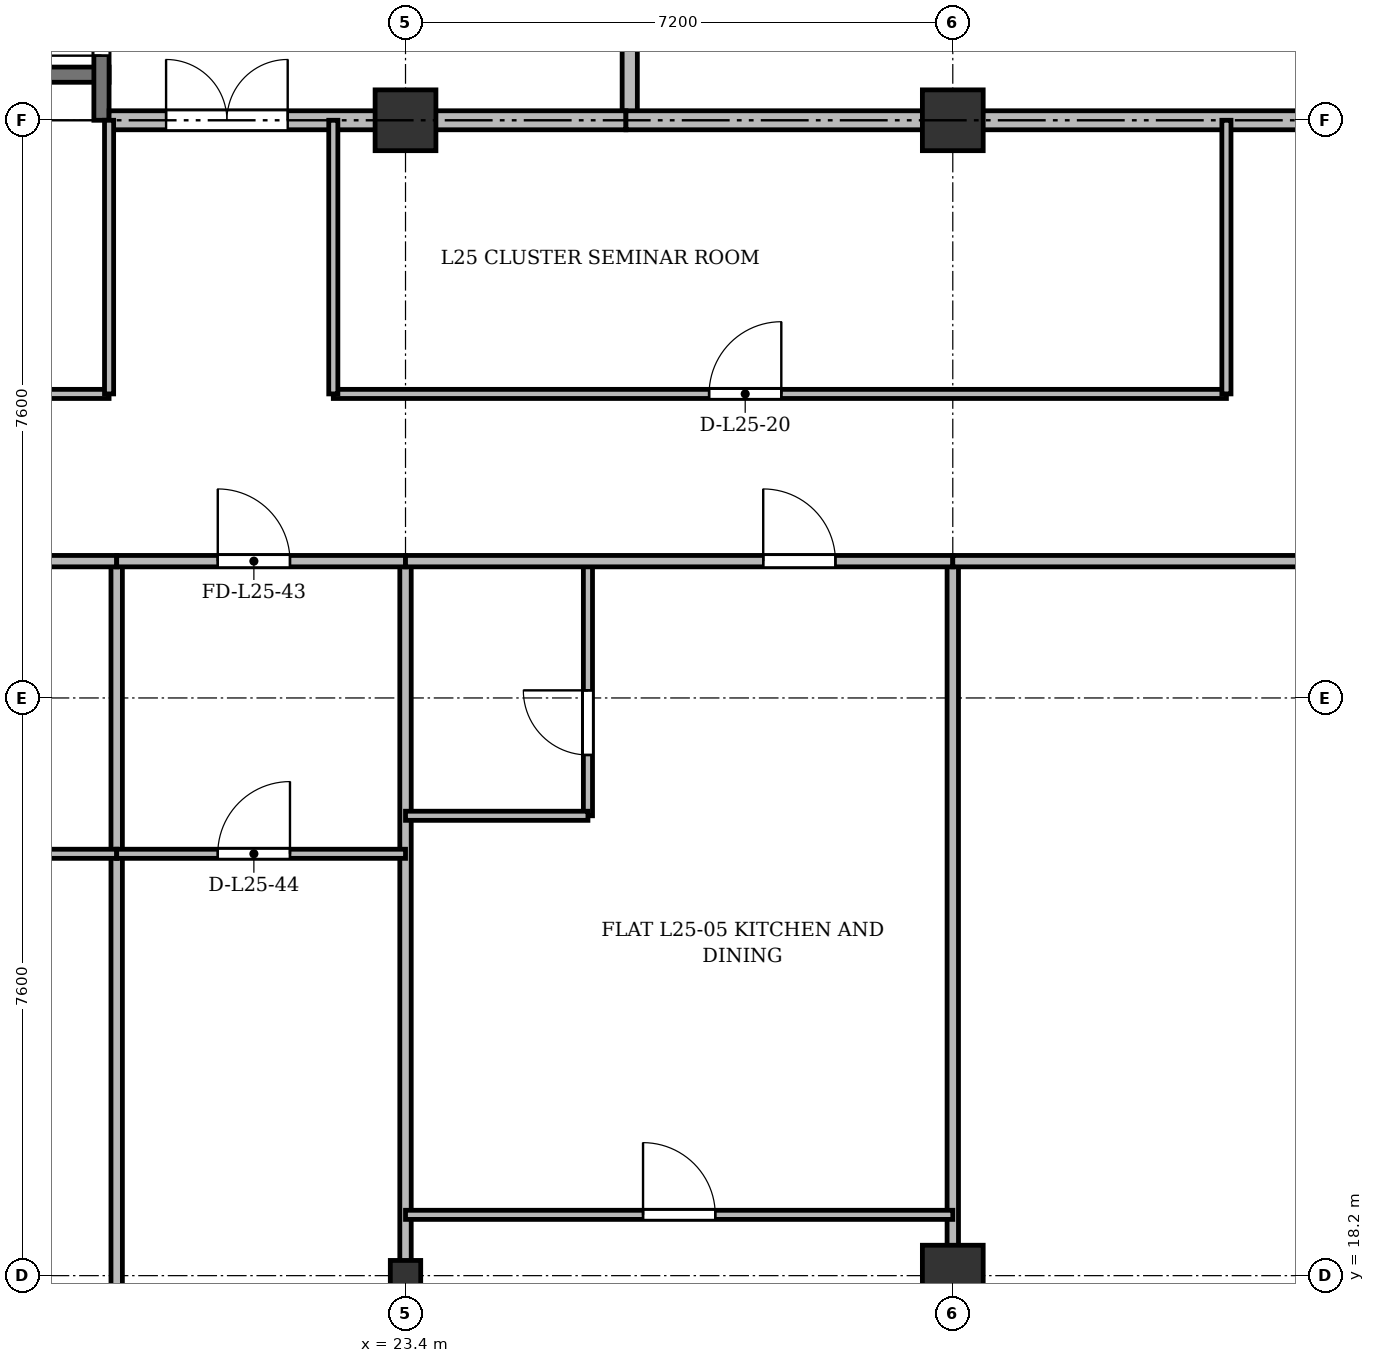
"""IFC4 building model, lengths in metres.
Left out: names, types, materials, properties, quantities, classifications, styles, units other than length and angle.
Written with IfcOpenShell. Run it as: python <this file> out.ifc"""

import sys

from ifc_helpers import new_model, si_unit, direction, frame, frame_2d, origin, origin_2d, place, context, subcontext, project, spatial, rectangle, i_section, extrude, source, transform, mapped, element, fill, save


model = new_model("IFC4")
c1 = context("Model", 3, precision=1e-05, world=origin(), true_north=direction((0.0, 1.0)))
c2 = subcontext(c1, "Body", "Model", "MODEL_VIEW")
j1 = project(units=[si_unit("LENGTHUNIT", "METRE"), si_unit("PLANEANGLEUNIT", "RADIAN")], contexts=[c1])
p1 = place(None, origin())
s1 = spatial("IfcSite", under=j1, at=p1, CompositionType="ELEMENT")
p2 = place(p1, origin())
s2 = spatial("IfcBuilding", under=s1, at=p2, CompositionType="ELEMENT")
p3 = place(p2, frame((0.0, 0.0, 99.7)))
s3 = spatial("IfcBuildingStorey", under=s2, at=p3, CompositionType="ELEMENT", Elevation=99.7)
m1 = source(origin(), c2, "Body", "SweptSolid", [
    extrude(i_section(OverallWidth=0.4, OverallDepth=0.4, WebThickness=0.022, FlangeThickness=0.035, at=origin_2d()), origin(), (0.0, 0.0, 1.0), 3.6),
])
p4 = place(p3, frame((23.4, 18.2, 0.0), z_axis=(0.0, 0.0, 1.0), x_axis=(1.0, 0.0, 0.0)))
e1 = element("IfcColumn", 1, at=p4, inside=s3, PredefinedType="COLUMN", context=c2, shape_type="MappedRepresentation", body=[
    mapped(m1, transform((0.0, 0.0, 0.0), x_axis=(1.0, 0.0, 0.0), y_axis=(0.0, 1.0, 0.0), z_axis=(0.0, 0.0, 1.0), scale=1.0)),
])
m2 = source(origin(), c2, "Body", "SweptSolid", [
    extrude(rectangle(XDim=0.8, YDim=0.8, at=origin_2d()), origin(), (0.0, 0.0, 1.0), 3.6),
])
for number, where, z_axis, x_axis in (
    (2, (23.4, 33.4, 0.0), (0.0, 0.0, 1.0), (1.0, 0.0, 0.0)),
    (3, (30.6, 18.2, 0.0), (0.0, 0.0, 1.0), (1.0, 0.0, 0.0)),
    (4, (30.6, 33.4, 0.0), (0.0, 0.0, 1.0), (1.0, 0.0, 0.0)),
):
    element("IfcColumn", number, at=place(p3, frame(where, z_axis=z_axis, x_axis=x_axis)), inside=s3, PredefinedType="COLUMN", context=c2, shape_type="MappedRepresentation", body=[
        mapped(m2, transform((0.0, 0.0, 0.0), x_axis=(1.0, 0.0, 0.0), y_axis=(0.0, 1.0, 0.0), z_axis=(0.0, 0.0, 1.0), scale=1.0)),
    ])
p5 = place(p3, frame((16.1, 34.0, 0.0), z_axis=(0.0, 0.0, 1.0), x_axis=(1.0, 0.0, 0.0)))
e5 = element("IfcWall", 5, at=p5, inside=s3, PredefinedType="SHEAR", context=c2, shape_type="SweptSolid", body=[
    extrude(rectangle(XDim=3.4, YDim=0.2, at=frame_2d((1.7, 0.0))), origin(), (0.0, 0.0, 1.0), 3.34),
])
p6 = place(p3, frame((19.4, 33.4, 0.0), z_axis=(0.0, 0.0, 1.0), x_axis=(0.0, 1.0, 0.0)))
e6 = element("IfcWall", 6, at=p6, inside=s3, PredefinedType="SHEAR", context=c2, shape_type="SweptSolid", body=[
    extrude(rectangle(XDim=11.1, YDim=0.2, at=frame_2d((5.55, 0.0))), origin(), (0.0, 0.0, 1.0), 3.34),
])
p7 = place(p6, frame((0.85, 0.0, 0.0)))
e7 = element("IfcOpeningElement", 7, at=p7, cuts=e6, PredefinedType="OPENING", context=c2, shape_type="SweptSolid", body=[
    extrude(rectangle(XDim=1.1, YDim=2.15, at=frame_2d((0.55, 1.075))), frame((0.0, 0.11, 0.0), z_axis=(0.0, -1.0, 0.0), x_axis=(1.0, 0.0, 0.0)), (0.0, 0.0, 1.0), 0.22),
])
p8 = place(p3, frame((26.35, 33.4, 0.0), z_axis=(0.0, 0.0, 1.0), x_axis=(0.0, 1.0, 0.0)))
e8 = element("IfcWall", 8, at=p8, inside=s3, PredefinedType="SOLIDWALL", context=c2, shape_type="SweptSolid", body=[
    extrude(rectangle(XDim=11.3, YDim=0.2, at=frame_2d((5.65, 0.0))), origin(), (0.0, 0.0, 1.0), 2.752),
])
p9 = place(p3, frame((19.5, 33.4, 0.0), z_axis=(0.0, 0.0, 1.0), x_axis=(1.0, 0.0, 0.0)))
e9 = element("IfcWall", 9, at=p9, inside=s3, PredefinedType="PARTITIONING", context=c2, shape_type="SweptSolid", body=[
    extrude(rectangle(XDim=6.8, YDim=0.25, at=frame_2d((3.4, 0.0))), origin(), (0.0, 0.0, 1.0), 2.752),
])
p10 = place(p9, frame((0.75, 0.0, 0.0)))
e10 = element("IfcOpeningElement", 10, at=p10, cuts=e9, PredefinedType="OPENING", context=c2, shape_type="SweptSolid", body=[
    extrude(rectangle(XDim=1.6, YDim=2.2, at=frame_2d((0.8, 1.1))), frame((0.0, 0.135, 0.0), z_axis=(0.0, -1.0, 0.0), x_axis=(1.0, 0.0, 0.0)), (0.0, 0.0, 1.0), 0.27),
])
p11 = place(p3, frame((26.3, 33.4, 0.0), z_axis=(0.0, 0.0, 1.0), x_axis=(1.0, 0.0, 0.0)))
e11 = element("IfcWall", 11, at=p11, inside=s3, PredefinedType="PARTITIONING", context=c2, shape_type="SweptSolid", body=[
    extrude(rectangle(XDim=20.85, YDim=0.25, at=frame_2d((10.425, 0.0))), origin(), (0.0, 0.0, 1.0), 2.752),
])
p12 = place(p11, frame((9.2, 0.0, 0.0)))
e12 = element("IfcOpeningElement", 12, at=p12, cuts=e11, PredefinedType="OPENING", context=c2, shape_type="SweptSolid", body=[
    extrude(rectangle(XDim=1.6, YDim=2.2, at=frame_2d((0.8, 1.1))), frame((0.0, 0.135, 0.0), z_axis=(0.0, -1.0, 0.0), x_axis=(1.0, 0.0, 0.0)), (0.0, 0.0, 1.0), 0.27),
])
p13 = place(p3, frame((4.75, 29.8, 0.0), z_axis=(0.0, 0.0, 1.0), x_axis=(1.0, 0.0, 0.0)))
e13 = element("IfcWall", 13, at=p13, inside=s3, PredefinedType="PARTITIONING", context=c2, shape_type="SweptSolid", body=[
    extrude(rectangle(XDim=14.75, YDim=0.12, at=frame_2d((7.375, 0.0))), origin(), (0.0, 0.0, 1.0), 2.84),
])
p14 = place(p13, frame((6.9, 0.0, 0.0)))
e14 = element("IfcOpeningElement", 14, at=p14, cuts=e13, PredefinedType="OPENING", context=c2, shape_type="SweptSolid", body=[
    extrude(rectangle(XDim=0.95, YDim=2.15, at=frame_2d((0.475, 1.075))), frame((0.0, 0.07, 0.0), z_axis=(0.0, -1.0, 0.0), x_axis=(1.0, 0.0, 0.0)), (0.0, 0.0, 1.0), 0.14),
])
p15 = place(p3, frame((22.45, 29.8, 0.0), z_axis=(0.0, 0.0, 1.0), x_axis=(1.0, 0.0, 0.0)))
e15 = element("IfcWall", 15, at=p15, inside=s3, PredefinedType="PARTITIONING", context=c2, shape_type="SweptSolid", body=[
    extrude(rectangle(XDim=11.75, YDim=0.12, at=frame_2d((5.875, 0.0))), origin(), (0.0, 0.0, 1.0), 2.84),
])
p16 = place(p15, frame((4.944, 0.0, 0.0)))
e16 = element("IfcOpeningElement", 16, at=p16, cuts=e15, PredefinedType="OPENING", context=c2, shape_type="SweptSolid", body=[
    extrude(rectangle(XDim=0.95, YDim=2.15, at=frame_2d((0.475, 1.075))), frame((0.0, 0.07, 0.0), z_axis=(0.0, -1.0, 0.0), x_axis=(1.0, 0.0, 0.0)), (0.0, 0.0, 1.0), 0.14),
])
for number, where, z_axis, x_axis in (
    (17, (19.5, 29.8, 0.0), (0.0, 0.0, 1.0), (0.0, 1.0, 0.0)),
    (18, (22.45, 29.8, 0.0), (0.0, 0.0, 1.0), (0.0, 1.0, 0.0)),
    (19, (34.2, 29.8, 0.0), (0.0, 0.0, 1.0), (0.0, 1.0, 0.0)),
):
    element("IfcWall", number, at=place(p3, frame(where, z_axis=z_axis, x_axis=x_axis)), inside=s3, PredefinedType="PARTITIONING", context=c2, shape_type="SweptSolid", body=[
        extrude(rectangle(XDim=3.6, YDim=0.12, at=frame_2d((1.8, 0.0))), origin(), (0.0, 0.0, 1.0), 2.752),
    ])
p17 = place(p3, frame((19.6, 3.145, 0.0), z_axis=(0.0, 0.0, 1.0), x_axis=(0.0, 1.0, 0.0)))
e20 = element("IfcWall", 20, at=p17, inside=s3, PredefinedType="PARTITIONING", context=c2, shape_type="SweptSolid", body=[
    extrude(rectangle(XDim=24.455, YDim=0.15, at=frame_2d((12.228, 0.0))), origin(), (0.0, 0.0, 1.0), 2.752),
])
for number, where, z_axis, x_axis in (
    (21, (23.4, 3.145, 0.0), (0.0, 0.0, 1.0), (0.0, 1.0, 0.0)),
    (22, (30.6, 3.145, 0.0), (0.0, 0.0, 1.0), (0.0, 1.0, 0.0)),
):
    element("IfcWall", number, at=place(p3, frame(where, z_axis=z_axis, x_axis=x_axis)), inside=s3, PredefinedType="PARTITIONING", context=c2, shape_type="SweptSolid", body=[
        extrude(rectangle(XDim=24.455, YDim=0.15, at=frame_2d((12.228, 0.0))), origin(), (0.0, 0.0, 1.0), 2.84),
    ])
p18 = place(p3, frame((15.6, 27.6, 0.0), z_axis=(0.0, 0.0, 1.0), x_axis=(1.0, 0.0, 0.0)))
e23 = element("IfcWall", 23, at=p18, inside=s3, PredefinedType="PARTITIONING", context=c2, shape_type="SweptSolid", body=[
    extrude(rectangle(XDim=4.0, YDim=0.15, at=frame_2d((2.0, 0.0))), origin(), (0.0, 0.0, 1.0), 2.84),
])
p19 = place(p18, frame((1.525, 0.0, 0.0)))
e24 = element("IfcOpeningElement", 24, at=p19, cuts=e23, PredefinedType="OPENING", context=c2, shape_type="SweptSolid", body=[
    extrude(rectangle(XDim=0.95, YDim=2.15, at=frame_2d((0.475, 1.075))), frame((0.0, 0.085, 0.0), z_axis=(0.0, -1.0, 0.0), x_axis=(1.0, 0.0, 0.0)), (0.0, 0.0, 1.0), 0.17),
])
p20 = place(p3, frame((15.6, 23.75, 0.0), z_axis=(0.0, 0.0, 1.0), x_axis=(1.0, 0.0, 0.0)))
e25 = element("IfcWall", 25, at=p20, inside=s3, PredefinedType="PARTITIONING", context=c2, shape_type="SweptSolid", body=[
    extrude(rectangle(XDim=4.0, YDim=0.12, at=frame_2d((2.0, 0.0))), origin(), (0.0, 0.0, 1.0), 2.84),
])
p21 = place(p20, frame((1.525, 0.0, 0.0)))
e26 = element("IfcOpeningElement", 26, at=p21, cuts=e25, PredefinedType="OPENING", context=c2, shape_type="SweptSolid", body=[
    extrude(rectangle(XDim=0.95, YDim=2.15, at=frame_2d((0.475, 1.075))), frame((0.0, 0.07, 0.0), z_axis=(0.0, -1.0, 0.0), x_axis=(1.0, 0.0, 0.0)), (0.0, 0.0, 1.0), 0.14),
])
p22 = place(p3, frame((19.6, 27.6, 0.0), z_axis=(0.0, 0.0, 1.0), x_axis=(1.0, 0.0, 0.0)))
e27 = element("IfcWall", 27, at=p22, inside=s3, PredefinedType="PARTITIONING", context=c2, shape_type="SweptSolid", body=[
    extrude(rectangle(XDim=3.8, YDim=0.15, at=frame_2d((1.9, 0.0))), origin(), (0.0, 0.0, 1.0), 2.84),
])
p23 = place(p22, frame((1.33, 0.0, 0.0)))
e28 = element("IfcOpeningElement", 28, at=p23, cuts=e27, PredefinedType="OPENING", context=c2, shape_type="SweptSolid", body=[
    extrude(rectangle(XDim=0.95, YDim=2.15, at=frame_2d((0.475, 1.075))), frame((0.0, 0.085, 0.0), z_axis=(0.0, -1.0, 0.0), x_axis=(1.0, 0.0, 0.0)), (0.0, 0.0, 1.0), 0.17),
])
p24 = place(p3, frame((19.6, 23.75, 0.0), z_axis=(0.0, 0.0, 1.0), x_axis=(1.0, 0.0, 0.0)))
e29 = element("IfcWall", 29, at=p24, inside=s3, PredefinedType="PARTITIONING", context=c2, shape_type="SweptSolid", body=[
    extrude(rectangle(XDim=3.8, YDim=0.12, at=frame_2d((1.9, 0.0))), origin(), (0.0, 0.0, 1.0), 2.84),
])
p25 = place(p24, frame((1.33, 0.0, 0.0)))
e30 = element("IfcOpeningElement", 30, at=p25, cuts=e29, PredefinedType="OPENING", context=c2, shape_type="SweptSolid", body=[
    extrude(rectangle(XDim=0.95, YDim=2.15, at=frame_2d((0.475, 1.075))), frame((0.0, 0.07, 0.0), z_axis=(0.0, -1.0, 0.0), x_axis=(1.0, 0.0, 0.0)), (0.0, 0.0, 1.0), 0.14),
])
p26 = place(p3, frame((23.4, 19.0, 0.0), z_axis=(0.0, 0.0, 1.0), x_axis=(1.0, 0.0, 0.0)))
e31 = element("IfcWall", 31, at=p26, inside=s3, PredefinedType="PARTITIONING", context=c2, shape_type="SweptSolid", body=[
    extrude(rectangle(XDim=7.2, YDim=0.12, at=frame_2d((3.6, 0.0))), origin(), (0.0, 0.0, 1.0), 2.84),
])
p27 = place(p26, frame((3.125, 0.0, 0.0)))
e32 = element("IfcOpeningElement", 32, at=p27, cuts=e31, PredefinedType="OPENING", context=c2, shape_type="SweptSolid", body=[
    extrude(rectangle(XDim=0.95, YDim=2.15, at=frame_2d((0.475, 1.075))), frame((0.0, 0.07, 0.0), z_axis=(0.0, -1.0, 0.0), x_axis=(1.0, 0.0, 0.0)), (0.0, 0.0, 1.0), 0.14),
])
p28 = place(p3, frame((25.8, 24.25, 0.0), z_axis=(0.0, 0.0, 1.0), x_axis=(0.0, 1.0, 0.0)))
e33 = element("IfcWall", 33, at=p28, inside=s3, PredefinedType="PARTITIONING", context=c2, shape_type="SweptSolid", body=[
    extrude(rectangle(XDim=3.35, YDim=0.12, at=frame_2d((1.675, 0.0))), origin(), (0.0, 0.0, 1.0), 2.99),
])
p29 = place(p28, frame((0.8, 0.0, 0.0)))
e34 = element("IfcOpeningElement", 34, at=p29, cuts=e33, PredefinedType="OPENING", context=c2, shape_type="SweptSolid", body=[
    extrude(rectangle(XDim=0.85, YDim=2.1, at=frame_2d((0.425, 1.05))), frame((0.0, 0.07, 0.0), z_axis=(0.0, -1.0, 0.0), x_axis=(1.0, 0.0, 0.0)), (0.0, 0.0, 1.0), 0.14),
])
p30 = place(p3, frame((23.4, 24.25, 0.0), z_axis=(0.0, 0.0, 1.0), x_axis=(1.0, 0.0, 0.0)))
e35 = element("IfcWall", 35, at=p30, inside=s3, PredefinedType="PARTITIONING", context=c2, shape_type="SweptSolid", body=[
    extrude(rectangle(XDim=2.4, YDim=0.12, at=frame_2d((1.2, 0.0))), origin(), (0.0, 0.0, 1.0), 2.84),
])
p31 = place(p3, frame((23.4, 27.6, 0.0), z_axis=(0.0, 0.0, 1.0), x_axis=(1.0, 0.0, 0.0)))
e36 = element("IfcWall", 36, at=p31, inside=s3, PredefinedType="PARTITIONING", context=c2, shape_type="SweptSolid", body=[
    extrude(rectangle(XDim=7.2, YDim=0.15, at=frame_2d((3.6, 0.0))), origin(), (0.0, 0.0, 1.0), 2.84),
])
p32 = place(p31, frame((4.706, 0.0, 0.0)))
e37 = element("IfcOpeningElement", 37, at=p32, cuts=e36, PredefinedType="OPENING", context=c2, shape_type="SweptSolid", body=[
    extrude(rectangle(XDim=0.95, YDim=2.15, at=frame_2d((0.475, 1.075))), frame((0.0, 0.085, 0.0), z_axis=(0.0, -1.0, 0.0), x_axis=(1.0, 0.0, 0.0)), (0.0, 0.0, 1.0), 0.17),
])
p33 = place(p3, frame((30.6, 27.6, 0.0), z_axis=(0.0, 0.0, 1.0), x_axis=(1.0, 0.0, 0.0)))
e38 = element("IfcWall", 38, at=p33, inside=s3, PredefinedType="PARTITIONING", context=c2, shape_type="SweptSolid", body=[
    extrude(rectangle(XDim=13.2, YDim=0.15, at=frame_2d((6.6, 0.0))), origin(), (0.0, 0.0, 1.0), 2.84),
])
p34 = place(p33, frame((5.8, 0.0, 0.0)))
e39 = element("IfcOpeningElement", 39, at=p34, cuts=e38, PredefinedType="OPENING", context=c2, shape_type="SweptSolid", body=[
    extrude(rectangle(XDim=1.6, YDim=2.2, at=frame_2d((0.8, 1.1))), frame((0.0, 0.085, 0.0), z_axis=(0.0, -1.0, 0.0), x_axis=(1.0, 0.0, 0.0)), (0.0, 0.0, 1.0), 0.17),
])
m3 = source(origin(), c2, "Body", "SweptSolid", [
    extrude(rectangle(XDim=1.1, YDim=2.15, at=frame_2d((0.55, 1.075))), frame((0.0, 0.025, 0.0), z_axis=(0.0, -1.0, 0.0), x_axis=(1.0, 0.0, 0.0)), (0.0, 0.0, 1.0), 0.05),
])
p35 = place(p7, origin())
e40 = element("IfcDoor", 40, at=p35, inside=s3, OperationType="SINGLE_SWING_LEFT", PredefinedType="DOOR", context=c2, shape_type="MappedRepresentation", body=[
    mapped(m3, transform((0.0, 0.0, 0.0), x_axis=(1.0, 0.0, 0.0), y_axis=(0.0, 1.0, 0.0), z_axis=(0.0, 0.0, 1.0), scale=1.0)),
])
fill(e7, e40)
m4 = source(origin(), c2, "Body", "SweptSolid", [
    extrude(rectangle(XDim=1.6, YDim=2.2, at=frame_2d((0.8, 1.1))), frame((0.0, 0.025, 0.0), z_axis=(0.0, -1.0, 0.0), x_axis=(1.0, 0.0, 0.0)), (0.0, 0.0, 1.0), 0.05),
])
p36 = place(p10, origin())
e41 = element("IfcDoor", 41, at=p36, inside=s3, OperationType="DOUBLE_DOOR_SINGLE_SWING", PredefinedType="DOOR", context=c2, shape_type="MappedRepresentation", body=[
    mapped(m4, transform((0.0, 0.0, 0.0), x_axis=(1.0, 0.0, 0.0), y_axis=(0.0, 1.0, 0.0), z_axis=(0.0, 0.0, 1.0), scale=1.0)),
])
fill(e10, e41)
m5 = source(origin(), c2, "Body", "SweptSolid", [
    extrude(rectangle(XDim=0.95, YDim=2.15, at=frame_2d((0.475, 1.075))), frame((0.0, 0.025, 0.0), z_axis=(0.0, -1.0, 0.0), x_axis=(1.0, 0.0, 0.0)), (0.0, 0.0, 1.0), 0.05),
])
p37 = place(p16, origin())
e42 = element("IfcDoor", 42, at=p37, inside=s3, OperationType="SINGLE_SWING_RIGHT", PredefinedType="DOOR", context=c2, shape_type="MappedRepresentation", body=[
    mapped(m5, transform((0.0, 0.0, 0.0), x_axis=(1.0, 0.0, 0.0), y_axis=(0.0, 1.0, 0.0), z_axis=(0.0, 0.0, 1.0), scale=1.0)),
])
fill(e16, e42)
p38 = place(p23, origin())
e43 = element("IfcDoor", 43, at=p38, inside=s3, OperationType="SINGLE_SWING_LEFT", PredefinedType="DOOR", context=c2, shape_type="MappedRepresentation", body=[
    mapped(m5, transform((0.0, 0.0, 0.0), x_axis=(1.0, 0.0, 0.0), y_axis=(0.0, 1.0, 0.0), z_axis=(0.0, 0.0, 1.0), scale=1.0)),
])
fill(e28, e43)
p39 = place(p25, origin())
e44 = element("IfcDoor", 44, at=p39, inside=s3, OperationType="SINGLE_SWING_RIGHT", PredefinedType="DOOR", context=c2, shape_type="MappedRepresentation", body=[
    mapped(m5, transform((0.0, 0.0, 0.0), x_axis=(1.0, 0.0, 0.0), y_axis=(0.0, 1.0, 0.0), z_axis=(0.0, 0.0, 1.0), scale=1.0)),
])
fill(e30, e44)
p40 = place(p27, origin())
e45 = element("IfcDoor", 45, at=p40, inside=s3, OperationType="SINGLE_SWING_LEFT", PredefinedType="DOOR", context=c2, shape_type="MappedRepresentation", body=[
    mapped(m5, transform((0.0, 0.0, 0.0), x_axis=(1.0, 0.0, 0.0), y_axis=(0.0, 1.0, 0.0), z_axis=(0.0, 0.0, 1.0), scale=1.0)),
])
fill(e32, e45)
m6 = source(origin(), c2, "Body", "SweptSolid", [
    extrude(rectangle(XDim=0.85, YDim=2.1, at=frame_2d((0.425, 1.05))), frame((0.0, 0.025, 0.0), z_axis=(0.0, -1.0, 0.0), x_axis=(1.0, 0.0, 0.0)), (0.0, 0.0, 1.0), 0.05),
])
p41 = place(p29, origin())
e46 = element("IfcDoor", 46, at=p41, inside=s3, OperationType="SINGLE_SWING_RIGHT", PredefinedType="DOOR", context=c2, shape_type="MappedRepresentation", body=[
    mapped(m6, transform((0.0, 0.0, 0.0), x_axis=(1.0, 0.0, 0.0), y_axis=(0.0, 1.0, 0.0), z_axis=(0.0, 0.0, 1.0), scale=1.0)),
])
fill(e34, e46)
p42 = place(p32, origin())
e47 = element("IfcDoor", 47, at=p42, inside=s3, OperationType="SINGLE_SWING_LEFT", PredefinedType="DOOR", context=c2, shape_type="MappedRepresentation", body=[
    mapped(m5, transform((0.0, 0.0, 0.0), x_axis=(1.0, 0.0, 0.0), y_axis=(0.0, 1.0, 0.0), z_axis=(0.0, 0.0, 1.0), scale=1.0)),
])
fill(e37, e47)
save(model, sys.argv[1])
